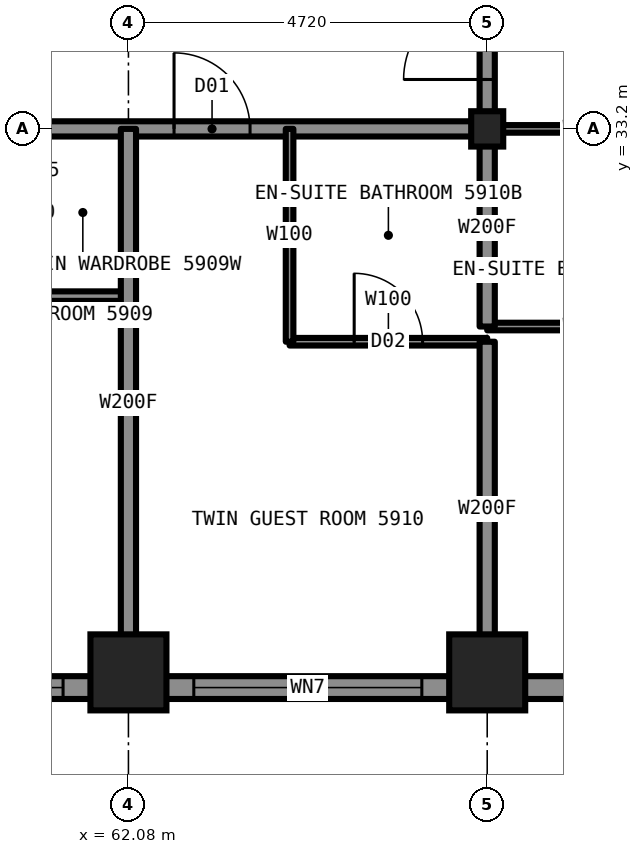
"""IFC4 building model, lengths in metres.
Left out: names, types, materials, properties, quantities, classifications, styles, units other than length and angle.
Written with IfcOpenShell. Run it as: python <this file> out.ifc"""

import sys

from ifc_helpers import new_model, si_unit, direction, frame, frame_2d, origin, origin_2d, place, context, subcontext, project, spatial, rectangle, i_section, extrude, element, fill, save


model = new_model("IFC4")
c1 = context("Model", 3, precision=1e-05, world=origin(), true_north=direction((0.0, 1.0)))
c2 = subcontext(c1, "Body", "Model", "MODEL_VIEW")
j1 = project(units=[si_unit("LENGTHUNIT", "METRE"), si_unit("PLANEANGLEUNIT", "RADIAN")], contexts=[c1])
p1 = place(None, origin())
s1 = spatial("IfcSite", under=j1, at=p1, CompositionType="ELEMENT")
p2 = place(p1, origin())
s2 = spatial("IfcBuilding", under=s1, at=p2, CompositionType="ELEMENT")
p3 = place(p2, frame((0.0, 0.0, 214.3)))
s3 = spatial("IfcBuildingStorey", under=s2, at=p3, CompositionType="ELEMENT", Elevation=214.3)
for number, where, z_axis, x_axis in (
    (1, (62.08, 26.05, 0.0), (0.0, 0.0, 1.0), (1.0, 0.0, 0.0)),
    (2, (66.8, 26.05, 0.0), (0.0, 0.0, 1.0), (1.0, 0.0, 0.0)),
):
    element("IfcColumn", number, at=place(p3, frame(where, z_axis=z_axis, x_axis=x_axis)), inside=s3, PredefinedType="COLUMN", context=c2, shape_type="SweptSolid", body=[
        extrude(i_section(OverallWidth=0.411, OverallDepth=0.434, WebThickness=0.036, FlangeThickness=0.057, at=origin_2d()), origin(), (0.0, 0.0, 1.0), 3.5),
    ])
p4 = place(p3, frame((66.8, 33.2, 0.0), z_axis=(0.0, 0.0, 1.0), x_axis=(1.0, 0.0, 0.0)))
e3 = element("IfcColumn", 3, at=p4, inside=s3, PredefinedType="COLUMN", context=c2, shape_type="SweptSolid", body=[
    extrude(i_section(OverallWidth=0.422, OverallDepth=0.465, WebThickness=0.045, FlangeThickness=0.073, at=origin_2d()), origin(), (0.0, 0.0, 1.0), 3.5),
])
p5 = place(p3, frame((66.8, 33.2, 0.0), z_axis=(0.0, 0.0, 1.0), x_axis=(1.0, 0.0, 0.0)))
e4 = element("IfcWall", 4, at=p5, inside=s3, PredefinedType="PARTITIONING", context=c2, shape_type="SweptSolid", body=[
    extrude(rectangle(XDim=2.6, YDim=0.1, at=frame_2d((1.3, 0.0))), origin(), (0.0, 0.0, 1.0), 2.573),
])
p6 = place(p3, frame((43.2, 33.2, 0.0), z_axis=(0.0, 0.0, 1.0), x_axis=(1.0, 0.0, 0.0)))
e5 = element("IfcWall", 5, at=p6, inside=s3, PredefinedType="PARTITIONING", context=c2, shape_type="SweptSolid", body=[
    extrude(rectangle(XDim=23.6, YDim=0.2, at=frame_2d((11.8, 0.0))), origin(), (0.0, 0.0, 1.0), 3.33),
])
p7 = place(p6, frame((0.7, 0.0, 0.0)))
e6 = element("IfcOpeningElement", 6, at=p7, cuts=e5, PredefinedType="OPENING", context=c2, shape_type="SweptSolid", body=[
    extrude(rectangle(XDim=1.0, YDim=2.2, at=frame_2d((0.5, 1.1))), frame((0.0, 0.11, 0.0), z_axis=(0.0, -1.0, 0.0), x_axis=(1.0, 0.0, 0.0)), (0.0, 0.0, 1.0), 0.22),
])
p8 = place(p6, frame((6.98, 0.0, 0.0)))
e7 = element("IfcOpeningElement", 7, at=p8, cuts=e5, PredefinedType="OPENING", context=c2, shape_type="SweptSolid", body=[
    extrude(rectangle(XDim=1.0, YDim=2.2, at=frame_2d((0.5, 1.1))), frame((0.0, 0.11, 0.0), z_axis=(0.0, -1.0, 0.0), x_axis=(1.0, 0.0, 0.0)), (0.0, 0.0, 1.0), 0.22),
])
p9 = place(p6, frame((9.84, 0.0, 0.0)))
e8 = element("IfcOpeningElement", 8, at=p9, cuts=e5, PredefinedType="OPENING", context=c2, shape_type="SweptSolid", body=[
    extrude(rectangle(XDim=1.0, YDim=2.2, at=frame_2d((0.5, 1.1))), frame((0.0, 0.11, 0.0), z_axis=(0.0, -1.0, 0.0), x_axis=(1.0, 0.0, 0.0)), (0.0, 0.0, 1.0), 0.22),
])
p10 = place(p6, frame((16.42, 0.0, 0.0)))
e9 = element("IfcOpeningElement", 9, at=p10, cuts=e5, PredefinedType="OPENING", context=c2, shape_type="SweptSolid", body=[
    extrude(rectangle(XDim=1.0, YDim=2.2, at=frame_2d((0.5, 1.1))), frame((0.0, 0.11, 0.0), z_axis=(0.0, -1.0, 0.0), x_axis=(1.0, 0.0, 0.0)), (0.0, 0.0, 1.0), 0.22),
])
p11 = place(p6, frame((19.28, 0.0, 0.0)))
e10 = element("IfcOpeningElement", 10, at=p11, cuts=e5, PredefinedType="OPENING", context=c2, shape_type="SweptSolid", body=[
    extrude(rectangle(XDim=1.0, YDim=2.2, at=frame_2d((0.5, 1.1))), frame((0.0, 0.11, 0.0), z_axis=(0.0, -1.0, 0.0), x_axis=(1.0, 0.0, 0.0)), (0.0, 0.0, 1.0), 0.22),
])
p12 = place(p3, frame((60.88, 31.0, 0.0), z_axis=(0.0, 0.0, 1.0), x_axis=(1.0, 0.0, 0.0)))
e11 = element("IfcWall", 11, at=p12, inside=s3, PredefinedType="PARTITIONING", context=c2, shape_type="SweptSolid", body=[
    extrude(rectangle(XDim=1.2, YDim=0.125, at=frame_2d((0.6, 0.0))), origin(), (0.0, 0.0, 1.0), 3.33),
])
p13 = place(p3, frame((66.8, 30.6, 0.0), z_axis=(0.0, 0.0, 1.0), x_axis=(1.0, 0.0, 0.0)))
e12 = element("IfcWall", 12, at=p13, inside=s3, PredefinedType="PARTITIONING", context=c2, shape_type="SweptSolid", body=[
    extrude(rectangle(XDim=2.6, YDim=0.1, at=frame_2d((1.3, 0.0))), origin(), (0.0, 0.0, 1.0), 3.33),
])
p14 = place(p3, frame((64.2, 30.4, 0.0), z_axis=(0.0, 0.0, 1.0), x_axis=(1.0, 0.0, 0.0)))
e13 = element("IfcWall", 13, at=p14, inside=s3, PredefinedType="PARTITIONING", context=c2, shape_type="SweptSolid", body=[
    extrude(rectangle(XDim=2.6, YDim=0.1, at=frame_2d((1.3, 0.0))), origin(), (0.0, 0.0, 1.0), 3.33),
])
p15 = place(p14, frame((0.85, 0.0, 0.0)))
e14 = element("IfcOpeningElement", 14, at=p15, cuts=e13, PredefinedType="OPENING", context=c2, shape_type="SweptSolid", body=[
    extrude(rectangle(XDim=0.9, YDim=2.1, at=frame_2d((0.45, 1.05))), frame((0.0, 0.06, 0.0), z_axis=(0.0, -1.0, 0.0), x_axis=(1.0, 0.0, 0.0)), (0.0, 0.0, 1.0), 0.12),
])
p16 = place(p3, frame((66.8, 33.2, 0.0), z_axis=(0.0, 0.0, 1.0), x_axis=(0.0, 1.0, 0.0)))
e15 = element("IfcWall", 15, at=p16, inside=s3, PredefinedType="PARTITIONING", context=c2, shape_type="SweptSolid", body=[
    extrude(rectangle(XDim=23.58, YDim=0.2, at=frame_2d((11.79, 0.0))), origin(), (0.0, 0.0, 1.0), 3.33),
])
p17 = place(p16, frame((5.12, 0.0, 0.0)))
e16 = element("IfcOpeningElement", 16, at=p17, cuts=e15, PredefinedType="OPENING", context=c2, shape_type="SweptSolid", body=[
    extrude(rectangle(XDim=1.0, YDim=2.2, at=frame_2d((0.5, 1.1))), frame((0.0, 0.11, 0.0), z_axis=(0.0, -1.0, 0.0), x_axis=(1.0, 0.0, 0.0)), (0.0, 0.0, 1.0), 0.22),
])
p18 = place(p16, frame((10.9, 0.0, 0.0)))
e17 = element("IfcOpeningElement", 17, at=p18, cuts=e15, PredefinedType="OPENING", context=c2, shape_type="SweptSolid", body=[
    extrude(rectangle(XDim=1.0, YDim=2.2, at=frame_2d((0.5, 1.1))), frame((0.0, 0.11, 0.0), z_axis=(0.0, -1.0, 0.0), x_axis=(1.0, 0.0, 0.0)), (0.0, 0.0, 1.0), 0.22),
])
p19 = place(p16, frame((17.31, 0.0, 0.0)))
e18 = element("IfcOpeningElement", 18, at=p19, cuts=e15, PredefinedType="OPENING", context=c2, shape_type="SweptSolid", body=[
    extrude(rectangle(XDim=1.0, YDim=2.2, at=frame_2d((0.5, 1.1))), frame((0.0, 0.11, 0.0), z_axis=(0.0, -1.0, 0.0), x_axis=(1.0, 0.0, 0.0)), (0.0, 0.0, 1.0), 0.22),
])
p20 = place(p16, frame((22.05, 0.0, 0.0)))
e19 = element("IfcOpeningElement", 19, at=p20, cuts=e15, PredefinedType="OPENING", context=c2, shape_type="SweptSolid", body=[
    extrude(rectangle(XDim=1.1, YDim=2.2, at=frame_2d((0.55, 1.1))), frame((0.0, 0.11, 0.0), z_axis=(0.0, -1.0, 0.0), x_axis=(1.0, 0.0, 0.0)), (0.0, 0.0, 1.0), 0.22),
])
p21 = place(p16, frame((0.65, 0.0, 0.0)))
e20 = element("IfcOpeningElement", 20, at=p21, cuts=e15, PredefinedType="OPENING", context=c2, shape_type="SweptSolid", body=[
    extrude(rectangle(XDim=1.1, YDim=2.2, at=frame_2d((0.55, 1.1))), frame((0.0, 0.11, 0.0), z_axis=(0.0, -1.0, 0.0), x_axis=(1.0, 0.0, 0.0)), (0.0, 0.0, 1.0), 0.22),
])
p22 = place(p3, frame((66.8, 26.0, 0.0), z_axis=(0.0, 0.0, 1.0), x_axis=(0.0, 1.0, 0.0)))
e21 = element("IfcWall", 21, at=p22, inside=s3, PredefinedType="PARTITIONING", context=c2, shape_type="SweptSolid", body=[
    extrude(rectangle(XDim=4.4, YDim=0.2, at=frame_2d((2.2, 0.0))), origin(), (0.0, 0.0, 1.0), 2.573),
])
p23 = place(p3, frame((66.8, 30.6, 0.0), z_axis=(0.0, 0.0, 1.0), x_axis=(0.0, 1.0, 0.0)))
e22 = element("IfcWall", 22, at=p23, inside=s3, PredefinedType="PARTITIONING", context=c2, shape_type="SweptSolid", body=[
    extrude(rectangle(XDim=2.6, YDim=0.2, at=frame_2d((1.3, 0.0))), origin(), (0.0, 0.0, 1.0), 2.573),
])
p24 = place(p3, frame((62.08, 26.0, 0.0), z_axis=(0.0, 0.0, 1.0), x_axis=(0.0, 1.0, 0.0)))
e23 = element("IfcWall", 23, at=p24, inside=s3, PredefinedType="PARTITIONING", context=c2, shape_type="SweptSolid", body=[
    extrude(rectangle(XDim=7.2, YDim=0.2, at=frame_2d((3.6, 0.0))), origin(), (0.0, 0.0, 1.0), 2.573),
])
p25 = place(p3, frame((64.2, 30.4, 0.0), z_axis=(0.0, 0.0, 1.0), x_axis=(0.0, 1.0, 0.0)))
e24 = element("IfcWall", 24, at=p25, inside=s3, PredefinedType="PARTITIONING", context=c2, shape_type="SweptSolid", body=[
    extrude(rectangle(XDim=2.8, YDim=0.1, at=frame_2d((1.4, 0.0))), origin(), (0.0, 0.0, 1.0), 3.33),
])
p26 = place(p3, frame((41.2, 25.85, 0.0), z_axis=(0.0, 0.0, 1.0), x_axis=(1.0, 0.0, 0.0)))
e25 = element("IfcWall", 25, at=p26, inside=s3, PredefinedType="SOLIDWALL", context=c2, shape_type="SweptSolid", body=[
    extrude(rectangle(XDim=27.6, YDim=0.3, at=frame_2d((13.8, 0.0))), origin(), (0.0, 0.0, 1.0), 2.63),
])
p27 = place(p26, frame((2.86, 0.0, 0.3)))
e26 = element("IfcOpeningElement", 26, at=p27, cuts=e25, PredefinedType="OPENING", context=c2, shape_type="SweptSolid", body=[
    extrude(rectangle(XDim=3.0, YDim=2.0, at=frame_2d((1.5, 1.0))), frame((0.0, 0.16, 0.0), z_axis=(0.0, -1.0, 0.0), x_axis=(1.0, 0.0, 0.0)), (0.0, 0.0, 1.0), 0.32),
])
p28 = place(p26, frame((7.58, 0.0, 0.3)))
e27 = element("IfcOpeningElement", 27, at=p28, cuts=e25, PredefinedType="OPENING", context=c2, shape_type="SweptSolid", body=[
    extrude(rectangle(XDim=3.0, YDim=2.0, at=frame_2d((1.5, 1.0))), frame((0.0, 0.16, 0.0), z_axis=(0.0, -1.0, 0.0), x_axis=(1.0, 0.0, 0.0)), (0.0, 0.0, 1.0), 0.32),
])
p29 = place(p26, frame((12.3, 0.0, 0.3)))
e28 = element("IfcOpeningElement", 28, at=p29, cuts=e25, PredefinedType="OPENING", context=c2, shape_type="SweptSolid", body=[
    extrude(rectangle(XDim=3.0, YDim=2.0, at=frame_2d((1.5, 1.0))), frame((0.0, 0.16, 0.0), z_axis=(0.0, -1.0, 0.0), x_axis=(1.0, 0.0, 0.0)), (0.0, 0.0, 1.0), 0.32),
])
p30 = place(p26, frame((17.02, 0.0, 0.3)))
e29 = element("IfcOpeningElement", 29, at=p30, cuts=e25, PredefinedType="OPENING", context=c2, shape_type="SweptSolid", body=[
    extrude(rectangle(XDim=3.0, YDim=2.0, at=frame_2d((1.5, 1.0))), frame((0.0, 0.16, 0.0), z_axis=(0.0, -1.0, 0.0), x_axis=(1.0, 0.0, 0.0)), (0.0, 0.0, 1.0), 0.32),
])
p31 = place(p26, frame((21.74, 0.0, 0.3)))
e30 = element("IfcOpeningElement", 30, at=p31, cuts=e25, PredefinedType="OPENING", context=c2, shape_type="SweptSolid", body=[
    extrude(rectangle(XDim=3.0, YDim=2.0, at=frame_2d((1.5, 1.0))), frame((0.0, 0.16, 0.0), z_axis=(0.0, -1.0, 0.0), x_axis=(1.0, 0.0, 0.0)), (0.0, 0.0, 1.0), 0.32),
])
p32 = place(p11, origin())
e31 = element("IfcDoor", 31, at=p32, inside=s3, OperationType="SINGLE_SWING_LEFT", PredefinedType="DOOR", context=c2, shape_type="SweptSolid", body=[
    extrude(rectangle(XDim=1.0, YDim=2.2, at=frame_2d((0.5, 1.1))), frame((0.0, 0.025, 0.0), z_axis=(0.0, -1.0, 0.0), x_axis=(1.0, 0.0, 0.0)), (0.0, 0.0, 1.0), 0.05),
])
fill(e10, e31)
p33 = place(p15, origin())
e32 = element("IfcDoor", 32, at=p33, inside=s3, OperationType="SINGLE_SWING_RIGHT", PredefinedType="DOOR", context=c2, shape_type="SweptSolid", body=[
    extrude(rectangle(XDim=0.9, YDim=2.1, at=frame_2d((0.45, 1.05))), frame((0.0, 0.025, 0.0), z_axis=(0.0, -1.0, 0.0), x_axis=(1.0, 0.0, 0.0)), (0.0, 0.0, 1.0), 0.05),
])
fill(e14, e32)
p34 = place(p21, origin())
e33 = element("IfcDoor", 33, at=p34, inside=s3, OperationType="SINGLE_SWING_LEFT", PredefinedType="DOOR", context=c2, shape_type="SweptSolid", body=[
    extrude(rectangle(XDim=1.1, YDim=2.2, at=frame_2d((0.55, 1.1))), frame((0.0, 0.025, 0.0), z_axis=(0.0, -1.0, 0.0), x_axis=(1.0, 0.0, 0.0)), (0.0, 0.0, 1.0), 0.05),
])
fill(e20, e33)
p35 = place(p30, origin())
e34 = element("IfcWindow", 34, at=p35, inside=s3, PartitioningType="SINGLE_PANEL", PredefinedType="WINDOW", context=c2, shape_type="SweptSolid", body=[
    extrude(rectangle(XDim=3.0, YDim=2.0, at=frame_2d((1.5, 1.0))), frame((0.0, 0.13, 0.0), z_axis=(0.0, -1.0, 0.0), x_axis=(1.0, 0.0, 0.0)), (0.0, 0.0, 1.0), 0.06),
])
fill(e29, e34)
p36 = place(p31, origin())
e35 = element("IfcWindow", 35, at=p36, inside=s3, PartitioningType="SINGLE_PANEL", PredefinedType="WINDOW", context=c2, shape_type="SweptSolid", body=[
    extrude(rectangle(XDim=3.0, YDim=2.0, at=frame_2d((1.5, 1.0))), frame((0.0, 0.13, 0.0), z_axis=(0.0, -1.0, 0.0), x_axis=(1.0, 0.0, 0.0)), (0.0, 0.0, 1.0), 0.06),
])
fill(e30, e35)
save(model, sys.argv[1])
